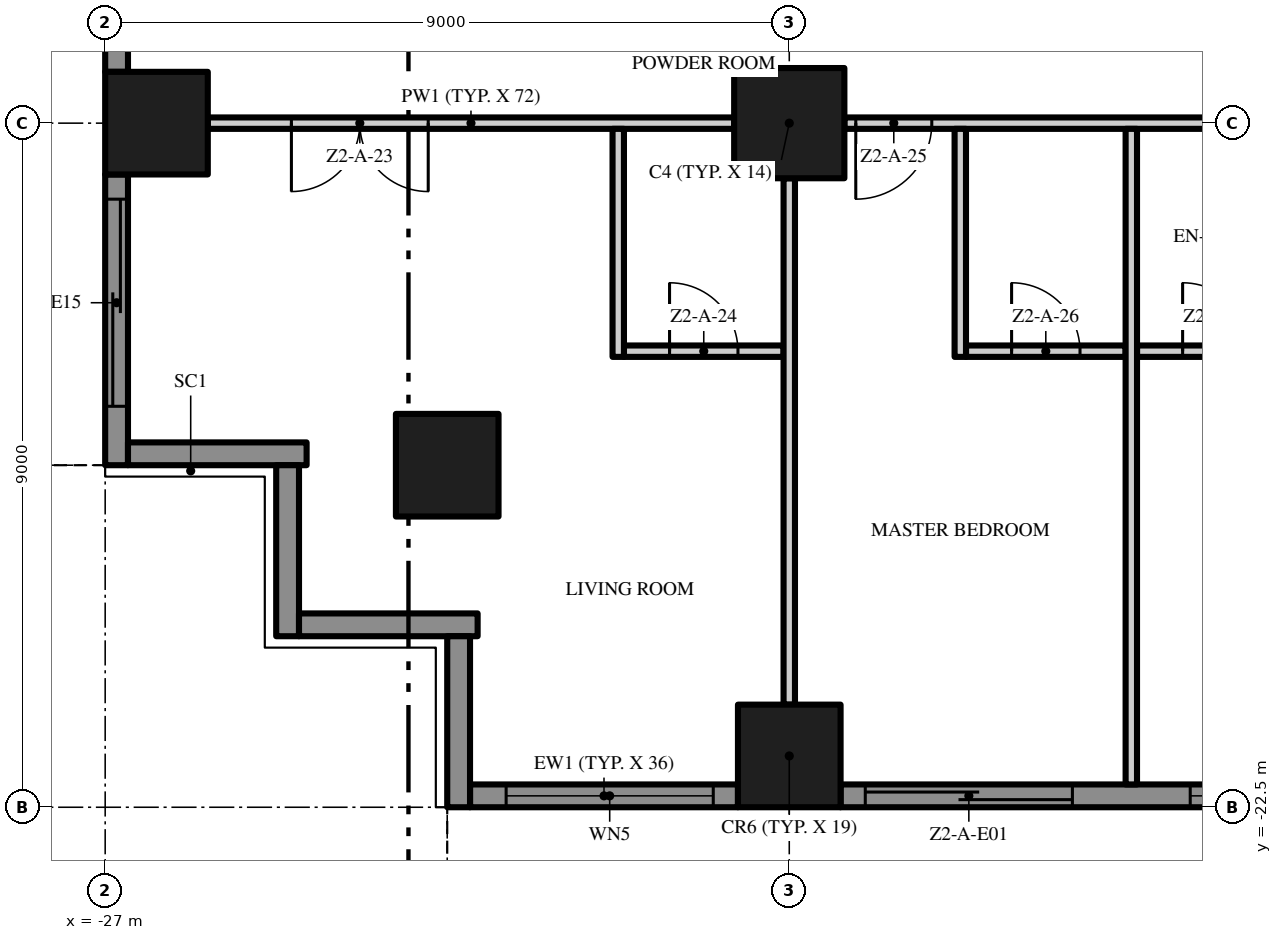
"""IFC4 building model, lengths in metres.
Left out: names, types, materials, properties, quantities, classifications, styles, units other than length and angle.
Written with IfcOpenShell. Run it as: python <this file> out.ifc"""

import sys

from ifc_helpers import new_model, si_unit, direction, frame, frame_2d, origin, origin_2d, place, context, subcontext, project, spatial, polyline, rectangle, outline, extrude, element, fill, save


model = new_model("IFC4")
c1 = context("Model", 3, precision=1e-05, world=origin(), true_north=direction((0.0, 1.0)))
c2 = subcontext(c1, "Body", "Model", "MODEL_VIEW")
j1 = project(units=[si_unit("LENGTHUNIT", "METRE"), si_unit("PLANEANGLEUNIT", "RADIAN")], contexts=[c1])
p1 = place(None, origin())
s1 = spatial("IfcSite", under=j1, at=p1, CompositionType="ELEMENT")
p2 = place(p1, origin())
s2 = spatial("IfcBuilding", under=s1, at=p2, CompositionType="ELEMENT")
p3 = place(p2, frame((0.0, 0.0, 73.2)))
s3 = spatial("IfcBuildingStorey", under=s2, at=p3, CompositionType="ELEMENT", Elevation=73.2)
p4 = place(p3, frame((-18.0, -13.5, 0.0), z_axis=(0.0, 0.0, 1.0), x_axis=(1.0, 0.0, 0.0)))
e1 = element("IfcColumn", 1, at=p4, inside=s3, PredefinedType="COLUMN", context=c2, shape_type="SweptSolid", body=[
    extrude(rectangle(XDim=1.45, YDim=1.45, at=origin_2d()), origin(), (0.0, 0.0, 1.0), 3.5),
])
for number, where, z_axis, x_axis in (
    (2, (-18.0, -21.825, 0.0), (0.0, 0.0, 1.0), (1.0, 0.0, 0.0)),
    (3, (-26.325, -13.5, 0.0), (0.0, 0.0, 1.0), (1.0, 0.0, 0.0)),
    (4, (-22.5, -18.0, 0.0), (0.0, 0.0, 1.0), (1.0, 0.0, 0.0)),
):
    element("IfcColumn", number, at=place(p3, frame(where, z_axis=z_axis, x_axis=x_axis)), inside=s3, PredefinedType="COLUMN", context=c2, shape_type="SweptSolid", body=[
        extrude(rectangle(XDim=1.35, YDim=1.35, at=origin_2d()), origin(), (0.0, 0.0, 1.0), 3.5),
    ])
p5 = place(p3, frame((-18.675, -22.35, 0.0), z_axis=(0.0, 0.0, 1.0), x_axis=(-1.0, 0.0, 0.0)))
e5 = element("IfcWall", 5, at=p5, inside=s3, PredefinedType="SOLIDWALL", context=c2, shape_type="SweptSolid", body=[
    extrude(rectangle(XDim=3.525, YDim=0.3, at=frame_2d((1.762, 0.0))), origin(), (0.0, 0.0, 1.0), 3.5),
])
p6 = place(p5, frame((0.325, 0.0, 0.45)))
e6 = element("IfcOpeningElement", 6, at=p6, cuts=e5, PredefinedType="OPENING", context=c2, shape_type="SweptSolid", body=[
    extrude(rectangle(XDim=2.725, YDim=2.65, at=frame_2d((1.363, 1.325))), frame((0.0, 0.16, 0.0), z_axis=(0.0, -1.0, 0.0), x_axis=(1.0, 0.0, 0.0)), (0.0, 0.0, 1.0), 0.32),
])
p7 = place(p3, frame((-9.675, -22.35, 0.0), z_axis=(0.0, 0.0, 1.0), x_axis=(-1.0, 0.0, 0.0)))
e7 = element("IfcWall", 7, at=p7, inside=s3, PredefinedType="SOLIDWALL", context=c2, shape_type="SweptSolid", body=[
    extrude(rectangle(XDim=7.65, YDim=0.3, at=frame_2d((3.825, 0.0))), origin(), (0.0, 0.0, 1.0), 3.5),
])
p8 = place(p7, frame((4.6, 0.0, 0.0)))
e8 = element("IfcOpeningElement", 8, at=p8, cuts=e7, PredefinedType="OPENING", context=c2, shape_type="SweptSolid", body=[
    extrude(rectangle(XDim=2.725, YDim=2.4, at=frame_2d((1.363, 1.2))), frame((0.0, 0.16, 0.0), z_axis=(0.0, -1.0, 0.0), x_axis=(1.0, 0.0, 0.0)), (0.0, 0.0, 1.0), 0.32),
])
p9 = place(p7, frame((0.325, 0.0, 0.45)))
e9 = element("IfcOpeningElement", 9, at=p9, cuts=e7, PredefinedType="OPENING", context=c2, shape_type="SweptSolid", body=[
    extrude(rectangle(XDim=2.725, YDim=2.65, at=frame_2d((1.363, 1.325))), frame((0.0, 0.16, 0.0), z_axis=(0.0, -1.0, 0.0), x_axis=(1.0, 0.0, 0.0)), (0.0, 0.0, 1.0), 0.32),
])
p10 = place(p3, frame((-26.85, -12.825, 0.0), z_axis=(0.0, 0.0, 1.0), x_axis=(0.0, 1.0, 0.0)))
e10 = element("IfcWall", 10, at=p10, inside=s3, PredefinedType="SOLIDWALL", context=c2, shape_type="SweptSolid", body=[
    extrude(rectangle(XDim=7.65, YDim=0.3, at=frame_2d((3.825, 0.0))), origin(), (0.0, 0.0, 1.0), 3.5),
])
p11 = place(p10, frame((4.6, 0.0, 0.45)))
e11 = element("IfcOpeningElement", 11, at=p11, cuts=e10, PredefinedType="OPENING", context=c2, shape_type="SweptSolid", body=[
    extrude(rectangle(XDim=2.725, YDim=2.65, at=frame_2d((1.363, 1.325))), frame((0.0, 0.16, 0.0), z_axis=(0.0, -1.0, 0.0), x_axis=(1.0, 0.0, 0.0)), (0.0, 0.0, 1.0), 0.32),
])
p12 = place(p10, frame((0.325, 0.0, 0.45)))
e12 = element("IfcOpeningElement", 12, at=p12, cuts=e10, PredefinedType="OPENING", context=c2, shape_type="SweptSolid", body=[
    extrude(rectangle(XDim=2.725, YDim=2.65, at=frame_2d((1.363, 1.325))), frame((0.0, 0.16, 0.0), z_axis=(0.0, -1.0, 0.0), x_axis=(1.0, 0.0, 0.0)), (0.0, 0.0, 1.0), 0.32),
])
p13 = place(p3, frame((-26.85, -18.0, 0.0), z_axis=(0.0, 0.0, 1.0), x_axis=(0.0, 1.0, 0.0)))
e13 = element("IfcWall", 13, at=p13, inside=s3, PredefinedType="SOLIDWALL", context=c2, shape_type="SweptSolid", body=[
    extrude(rectangle(XDim=3.825, YDim=0.3, at=frame_2d((1.913, 0.0))), origin(), (0.0, 0.0, 1.0), 3.5),
])
p14 = place(p13, frame((0.775, 0.0, 0.0)))
e14 = element("IfcOpeningElement", 14, at=p14, cuts=e13, PredefinedType="OPENING", context=c2, shape_type="SweptSolid", body=[
    extrude(rectangle(XDim=2.725, YDim=2.4, at=frame_2d((1.363, 1.2))), frame((0.0, 0.16, 0.0), z_axis=(0.0, -1.0, 0.0), x_axis=(1.0, 0.0, 0.0)), (0.0, 0.0, 1.0), 0.32),
])
p15 = place(p3, frame((-24.35, -17.85, 0.0), z_axis=(0.0, 0.0, 1.0), x_axis=(-1.0, 0.0, 0.0)))
e15 = element("IfcWall", 15, at=p15, inside=s3, PredefinedType="SOLIDWALL", context=c2, shape_type="SweptSolid", body=[
    extrude(rectangle(XDim=2.35, YDim=0.3, at=frame_2d((1.175, 0.0))), origin(), (0.0, 0.0, 1.0), 3.5),
])
p16 = place(p3, frame((-24.6, -20.25, 0.0), z_axis=(0.0, 0.0, 1.0), x_axis=(0.0, 1.0, 0.0)))
e16 = element("IfcWall", 16, at=p16, inside=s3, PredefinedType="SOLIDWALL", context=c2, shape_type="SweptSolid", body=[
    extrude(rectangle(XDim=2.25, YDim=0.3, at=frame_2d((1.125, 0.0))), origin(), (0.0, 0.0, 1.0), 3.5),
])
p17 = place(p3, frame((-22.1, -20.1, 0.0), z_axis=(0.0, 0.0, 1.0), x_axis=(-1.0, 0.0, 0.0)))
e17 = element("IfcWall", 17, at=p17, inside=s3, PredefinedType="SOLIDWALL", context=c2, shape_type="SweptSolid", body=[
    extrude(rectangle(XDim=2.35, YDim=0.3, at=frame_2d((1.175, 0.0))), origin(), (0.0, 0.0, 1.0), 3.5),
])
p18 = place(p3, frame((-22.35, -22.5, 0.0), z_axis=(0.0, 0.0, 1.0), x_axis=(0.0, 1.0, 0.0)))
e18 = element("IfcWall", 18, at=p18, inside=s3, PredefinedType="SOLIDWALL", context=c2, shape_type="SweptSolid", body=[
    extrude(rectangle(XDim=2.25, YDim=0.3, at=frame_2d((1.125, 0.0))), origin(), (0.0, 0.0, 1.0), 3.5),
])
p19 = place(p3, origin())
e19 = element("IfcWall", 19, at=p19, inside=s3, PredefinedType="USERDEFINED", context=c2, shape_type="SweptSolid", body=[
    extrude(outline(polyline([(-22.5, -23.451), (-21.0, -24.112), (-19.5, -24.845), (-18.0, -25.369), (-16.875, -25.5), (-16.5, -25.485), (-15.0, -25.149), (-13.5, -24.488), (-12.0, -23.755), (-10.5, -23.231), (-9.375, -23.1), (-9.0, -23.115), (-7.5, -23.451), (-6.0, -24.112), (-4.5, -24.845), (-3.0, -25.369), (-1.875, -25.5), (-1.5, -25.485), (0.0, -25.149), (1.5, -24.488), (3.0, -23.755), (4.5, -23.231), (5.625, -23.1), (6.0, -23.115), (7.5, -23.451), (9.0, -24.112), (10.5, -24.845), (12.0, -25.369), (13.125, -25.5), (13.5, -25.485), (15.0, -25.149), (16.5, -24.488), (18.0, -23.755), (19.5, -23.231), (20.625, -23.1), (21.0, -23.115), (22.5, -23.451), (22.555, -23.208), (21.033, -22.866), (20.615, -22.849), (19.444, -22.986), (17.904, -23.524), (16.395, -24.261), (14.921, -24.91), (13.467, -25.236), (13.135, -25.249), (12.056, -25.124), (10.596, -24.614), (9.105, -23.885), (7.579, -23.213), (6.033, -22.866), (5.615, -22.849), (4.444, -22.986), (2.904, -23.524), (1.395, -24.261), (-0.079, -24.91), (-1.533, -25.236), (-1.865, -25.249), (-2.944, -25.124), (-4.404, -24.614), (-5.895, -23.885), (-7.421, -23.213), (-8.967, -22.866), (-9.385, -22.849), (-10.556, -22.986), (-12.096, -23.524), (-13.605, -24.261), (-15.079, -24.91), (-16.533, -25.236), (-16.865, -25.249), (-17.944, -25.124), (-19.404, -24.614), (-20.895, -23.885), (-22.399, -23.223), (-22.5, -23.451)])), origin(), (0.0, 0.0, 1.0), 0.9),
])
p20 = place(p3, origin())
e20 = element("IfcWall", 20, at=p20, inside=s3, PredefinedType="USERDEFINED", context=c2, shape_type="SweptSolid", body=[
    extrude(outline(polyline([(-27.951, 18.0), (-28.612, 16.5), (-29.345, 15.0), (-29.869, 13.5), (-30.0, 12.375), (-29.985, 12.0), (-29.649, 10.5), (-28.988, 9.0), (-28.255, 7.5), (-27.731, 6.0), (-27.6, 4.875), (-27.615, 4.5), (-27.951, 3.0), (-28.612, 1.5), (-29.345, 0.0), (-29.869, -1.5), (-30.0, -2.625), (-29.985, -3.0), (-29.649, -4.5), (-28.988, -6.0), (-28.255, -7.5), (-27.731, -9.0), (-27.6, -10.125), (-27.615, -10.5), (-27.951, -12.0), (-28.612, -13.5), (-29.345, -15.0), (-29.869, -16.5), (-30.0, -17.625), (-29.985, -18.0), (-29.735, -17.99), (-29.749, -17.635), (-29.624, -16.556), (-29.114, -15.096), (-28.385, -13.605), (-27.713, -12.079), (-27.366, -10.533), (-27.349, -10.115), (-27.486, -8.944), (-28.024, -7.404), (-28.761, -5.895), (-29.41, -4.421), (-29.736, -2.967), (-29.749, -2.635), (-29.624, -1.556), (-29.114, -0.096), (-28.385, 1.395), (-27.713, 2.921), (-27.366, 4.467), (-27.349, 4.885), (-27.486, 6.056), (-28.024, 7.596), (-28.761, 9.105), (-29.41, 10.579), (-29.736, 12.033), (-29.749, 12.365), (-29.624, 13.444), (-29.114, 14.904), (-28.385, 16.395), (-27.723, 17.899), (-27.951, 18.0)])), origin(), (0.0, 0.0, 1.0), 0.9),
])
p21 = place(p3, frame((-20.175, -16.5, 0.0), z_axis=(0.0, 0.0, 1.0), x_axis=(1.0, 0.0, 0.0)))
e21 = element("IfcWall", 21, at=p21, inside=s3, PredefinedType="PARTITIONING", context=c2, shape_type="SweptSolid", body=[
    extrude(rectangle(XDim=2.1, YDim=0.15, at=frame_2d((1.05, 0.0))), origin(), (0.0, 0.0, 1.0), 3.5),
])
p22 = place(p21, frame((0.6, 0.0, 0.0)))
e22 = element("IfcOpeningElement", 22, at=p22, cuts=e21, PredefinedType="OPENING", context=c2, shape_type="SweptSolid", body=[
    extrude(rectangle(XDim=0.9, YDim=2.1, at=frame_2d((0.45, 1.05))), frame((0.0, 0.085, 0.0), z_axis=(0.0, -1.0, 0.0), x_axis=(1.0, 0.0, 0.0)), (0.0, 0.0, 1.0), 0.17),
])
p23 = place(p3, frame((-15.675, -16.5, 0.0), z_axis=(0.0, 0.0, 1.0), x_axis=(1.0, 0.0, 0.0)))
e23 = element("IfcWall", 23, at=p23, inside=s3, PredefinedType="PARTITIONING", context=c2, shape_type="SweptSolid", body=[
    extrude(rectangle(XDim=2.1, YDim=0.15, at=frame_2d((1.05, 0.0))), origin(), (0.0, 0.0, 1.0), 3.5),
])
p24 = place(p23, frame((0.6, 0.0, 0.0)))
e24 = element("IfcOpeningElement", 24, at=p24, cuts=e23, PredefinedType="OPENING", context=c2, shape_type="SweptSolid", body=[
    extrude(rectangle(XDim=0.9, YDim=2.1, at=frame_2d((0.45, 1.05))), frame((0.0, 0.085, 0.0), z_axis=(0.0, -1.0, 0.0), x_axis=(1.0, 0.0, 0.0)), (0.0, 0.0, 1.0), 0.17),
])
p25 = place(p3, frame((-13.425, -16.5, 0.0), z_axis=(0.0, 0.0, 1.0), x_axis=(1.0, 0.0, 0.0)))
e25 = element("IfcWall", 25, at=p25, inside=s3, PredefinedType="PARTITIONING", context=c2, shape_type="SweptSolid", body=[
    extrude(rectangle(XDim=2.1, YDim=0.15, at=frame_2d((1.05, 0.0))), origin(), (0.0, 0.0, 1.0), 3.5),
])
p26 = place(p25, frame((0.6, 0.0, 0.0)))
e26 = element("IfcOpeningElement", 26, at=p26, cuts=e25, PredefinedType="OPENING", context=c2, shape_type="SweptSolid", body=[
    extrude(rectangle(XDim=0.9, YDim=2.1, at=frame_2d((0.45, 1.05))), frame((0.0, 0.085, 0.0), z_axis=(0.0, -1.0, 0.0), x_axis=(1.0, 0.0, 0.0)), (0.0, 0.0, 1.0), 0.17),
])
p27 = place(p3, frame((-18.725, -13.5, 0.0), z_axis=(0.0, 0.0, 1.0), x_axis=(-1.0, 0.0, 0.0)))
e27 = element("IfcWall", 27, at=p27, inside=s3, PredefinedType="PARTITIONING", context=c2, shape_type="SweptSolid", body=[
    extrude(rectangle(XDim=6.925, YDim=0.15, at=frame_2d((3.462, 0.0))), origin(), (0.0, 0.0, 1.0), 3.5),
])
p28 = place(p27, frame((4.025, 0.0, 0.0)))
e28 = element("IfcOpeningElement", 28, at=p28, cuts=e27, PredefinedType="OPENING", context=c2, shape_type="SweptSolid", body=[
    extrude(rectangle(XDim=1.8, YDim=2.4, at=frame_2d((0.9, 1.2))), frame((0.0, 0.085, 0.0), z_axis=(0.0, -1.0, 0.0), x_axis=(1.0, 0.0, 0.0)), (0.0, 0.0, 1.0), 0.17),
])
p29 = place(p3, frame((-9.725, -13.5, 0.0), z_axis=(0.0, 0.0, 1.0), x_axis=(-1.0, 0.0, 0.0)))
e29 = element("IfcWall", 29, at=p29, inside=s3, PredefinedType="PARTITIONING", context=c2, shape_type="SweptSolid", body=[
    extrude(rectangle(XDim=7.55, YDim=0.15, at=frame_2d((3.775, 0.0))), origin(), (0.0, 0.0, 1.0), 3.5),
])
p30 = place(p29, frame((6.4, 0.0, 0.0)))
e30 = element("IfcOpeningElement", 30, at=p30, cuts=e29, PredefinedType="OPENING", context=c2, shape_type="SweptSolid", body=[
    extrude(rectangle(XDim=1.0, YDim=2.4, at=frame_2d((0.5, 1.2))), frame((0.0, 0.085, 0.0), z_axis=(0.0, -1.0, 0.0), x_axis=(1.0, 0.0, 0.0)), (0.0, 0.0, 1.0), 0.17),
])
p31 = place(p29, frame((0.15, 0.0, 0.0)))
e31 = element("IfcOpeningElement", 31, at=p31, cuts=e29, PredefinedType="OPENING", context=c2, shape_type="SweptSolid", body=[
    extrude(rectangle(XDim=1.0, YDim=2.4, at=frame_2d((0.5, 1.2))), frame((0.0, 0.085, 0.0), z_axis=(0.0, -1.0, 0.0), x_axis=(1.0, 0.0, 0.0)), (0.0, 0.0, 1.0), 0.17),
])
p32 = place(p3, frame((-20.25, -16.575, 0.0), z_axis=(0.0, 0.0, 1.0), x_axis=(0.0, 1.0, 0.0)))
e32 = element("IfcWall", 32, at=p32, inside=s3, PredefinedType="PARTITIONING", context=c2, shape_type="SweptSolid", body=[
    extrude(rectangle(XDim=3.0, YDim=0.15, at=frame_2d((1.5, 0.0))), origin(), (0.0, 0.0, 1.0), 3.5),
])
p33 = place(p3, frame((-18.0, -21.15, 0.0), z_axis=(0.0, 0.0, 1.0), x_axis=(0.0, 1.0, 0.0)))
e33 = element("IfcWall", 33, at=p33, inside=s3, PredefinedType="PARTITIONING", context=c2, shape_type="SweptSolid", body=[
    extrude(rectangle(XDim=6.925, YDim=0.15, at=frame_2d((3.462, 0.0))), origin(), (0.0, 0.0, 1.0), 3.5),
])
p34 = place(p3, frame((-15.75, -16.575, 0.0), z_axis=(0.0, 0.0, 1.0), x_axis=(0.0, 1.0, 0.0)))
e34 = element("IfcWall", 34, at=p34, inside=s3, PredefinedType="PARTITIONING", context=c2, shape_type="SweptSolid", body=[
    extrude(rectangle(XDim=3.0, YDim=0.15, at=frame_2d((1.5, 0.0))), origin(), (0.0, 0.0, 1.0), 3.5),
])
p35 = place(p3, frame((-13.5, -22.2, 0.0), z_axis=(0.0, 0.0, 1.0), x_axis=(0.0, 1.0, 0.0)))
e35 = element("IfcWall", 35, at=p35, inside=s3, PredefinedType="PARTITIONING", context=c2, shape_type="SweptSolid", body=[
    extrude(rectangle(XDim=8.625, YDim=0.15, at=frame_2d((4.312, 0.0))), origin(), (0.0, 0.0, 1.0), 3.5),
])
p36 = place(p6, origin())
e36 = element("IfcWindow", 36, at=p36, inside=s3, PartitioningType="SINGLE_PANEL", PredefinedType="WINDOW", context=c2, shape_type="SweptSolid", body=[
    extrude(rectangle(XDim=2.725, YDim=2.65, at=frame_2d((1.363, 1.325))), frame((0.0, 0.03, 0.0), z_axis=(0.0, -1.0, 0.0), x_axis=(1.0, 0.0, 0.0)), (0.0, 0.0, 1.0), 0.06),
])
fill(e6, e36)
p37 = place(p8, origin())
e37 = element("IfcDoor", 37, at=p37, inside=s3, OperationType="SINGLE_SWING_LEFT", PredefinedType="DOOR", context=c2, shape_type="SweptSolid", body=[
    extrude(rectangle(XDim=2.725, YDim=2.4, at=frame_2d((1.363, 1.2))), frame((0.0, 0.025, 0.0), z_axis=(0.0, -1.0, 0.0), x_axis=(1.0, 0.0, 0.0)), (0.0, 0.0, 1.0), 0.05),
])
fill(e8, e37)
p38 = place(p9, origin())
e38 = element("IfcWindow", 38, at=p38, inside=s3, PartitioningType="SINGLE_PANEL", PredefinedType="WINDOW", context=c2, shape_type="SweptSolid", body=[
    extrude(rectangle(XDim=2.725, YDim=2.65, at=frame_2d((1.363, 1.325))), frame((0.0, 0.03, 0.0), z_axis=(0.0, -1.0, 0.0), x_axis=(1.0, 0.0, 0.0)), (0.0, 0.0, 1.0), 0.06),
])
fill(e9, e38)
p39 = place(p14, origin())
e39 = element("IfcDoor", 39, at=p39, inside=s3, OperationType="SINGLE_SWING_LEFT", PredefinedType="DOOR", context=c2, shape_type="SweptSolid", body=[
    extrude(rectangle(XDim=2.725, YDim=2.4, at=frame_2d((1.363, 1.2))), frame((0.0, 0.025, 0.0), z_axis=(0.0, -1.0, 0.0), x_axis=(1.0, 0.0, 0.0)), (0.0, 0.0, 1.0), 0.05),
])
fill(e14, e39)
p40 = place(p28, origin())
e40 = element("IfcDoor", 40, at=p40, inside=s3, OperationType="DOUBLE_DOOR_SINGLE_SWING", PredefinedType="DOOR", context=c2, shape_type="SweptSolid", body=[
    extrude(rectangle(XDim=1.8, YDim=2.4, at=frame_2d((0.9, 1.2))), frame((0.0, 0.025, 0.0), z_axis=(0.0, -1.0, 0.0), x_axis=(1.0, 0.0, 0.0)), (0.0, 0.0, 1.0), 0.05),
])
fill(e28, e40)
p41 = place(p22, origin())
e41 = element("IfcDoor", 41, at=p41, inside=s3, OperationType="SINGLE_SWING_LEFT", PredefinedType="DOOR", context=c2, shape_type="SweptSolid", body=[
    extrude(rectangle(XDim=0.9, YDim=2.1, at=frame_2d((0.45, 1.05))), frame((0.0, 0.025, 0.0), z_axis=(0.0, -1.0, 0.0), x_axis=(1.0, 0.0, 0.0)), (0.0, 0.0, 1.0), 0.05),
])
fill(e22, e41)
p42 = place(p30, origin())
e42 = element("IfcDoor", 42, at=p42, inside=s3, OperationType="SINGLE_SWING_RIGHT", PredefinedType="DOOR", context=c2, shape_type="SweptSolid", body=[
    extrude(rectangle(XDim=1.0, YDim=2.4, at=frame_2d((0.5, 1.2))), frame((0.0, 0.025, 0.0), z_axis=(0.0, -1.0, 0.0), x_axis=(1.0, 0.0, 0.0)), (0.0, 0.0, 1.0), 0.05),
])
fill(e30, e42)
p43 = place(p24, origin())
e43 = element("IfcDoor", 43, at=p43, inside=s3, OperationType="SINGLE_SWING_LEFT", PredefinedType="DOOR", context=c2, shape_type="SweptSolid", body=[
    extrude(rectangle(XDim=0.9, YDim=2.1, at=frame_2d((0.45, 1.05))), frame((0.0, 0.025, 0.0), z_axis=(0.0, -1.0, 0.0), x_axis=(1.0, 0.0, 0.0)), (0.0, 0.0, 1.0), 0.05),
])
fill(e24, e43)
p44 = place(p26, origin())
e44 = element("IfcDoor", 44, at=p44, inside=s3, OperationType="SINGLE_SWING_LEFT", PredefinedType="DOOR", context=c2, shape_type="SweptSolid", body=[
    extrude(rectangle(XDim=0.9, YDim=2.1, at=frame_2d((0.45, 1.05))), frame((0.0, 0.025, 0.0), z_axis=(0.0, -1.0, 0.0), x_axis=(1.0, 0.0, 0.0)), (0.0, 0.0, 1.0), 0.05),
])
fill(e26, e44)
save(model, sys.argv[1])
